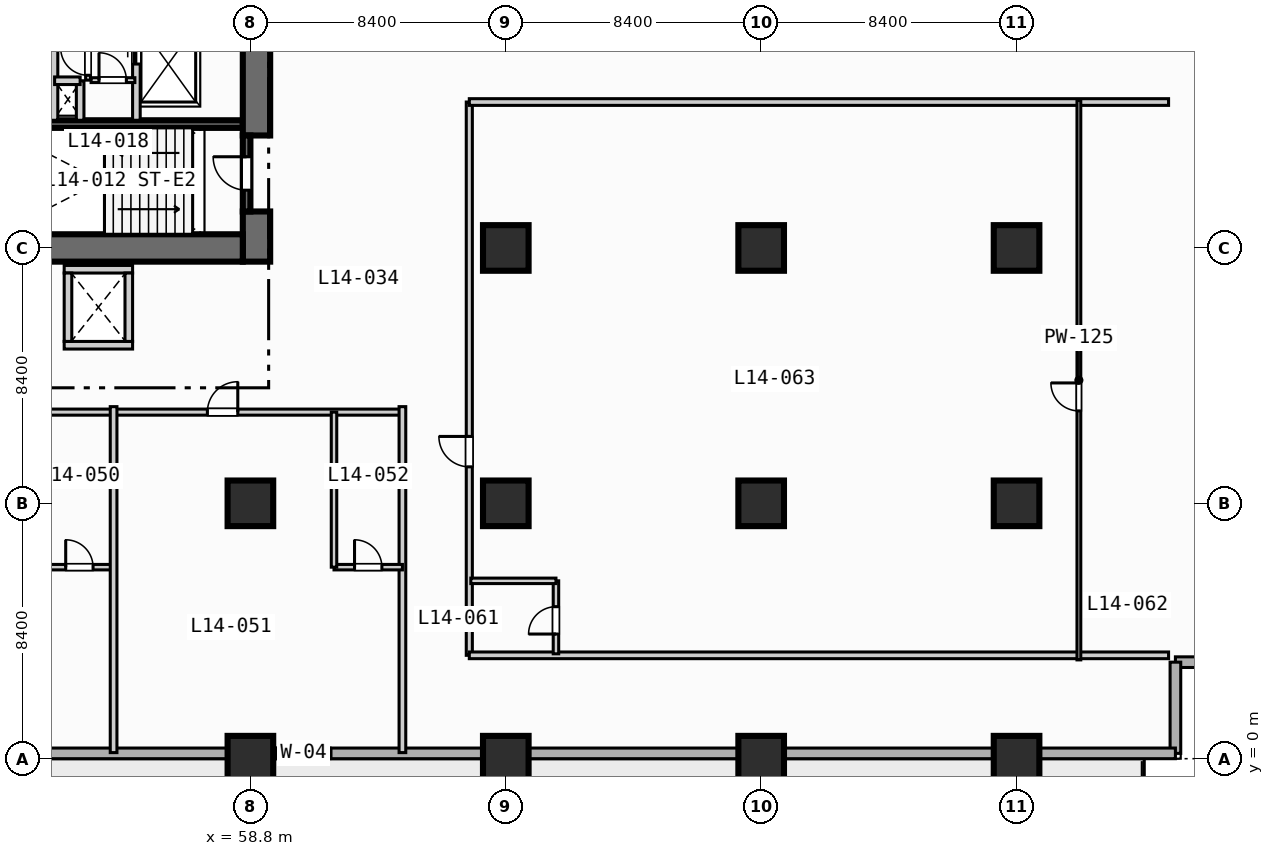
"""IFC4 building model, lengths in metres.
Left out: names, types, materials, properties, quantities, classifications, styles, units other than length and angle.
Written with IfcOpenShell. Run it as: python <this file> out.ifc"""

import sys

from ifc_helpers import new_model, si_unit, direction, frame, frame_2d, origin, origin_2d, place, context, subcontext, project, spatial, rectangle, extrude, element, fill, save


model = new_model("IFC4")
c1 = context("Model", 3, precision=1e-05, world=origin(), true_north=direction((0.0, 1.0)))
c2 = subcontext(c1, "Body", "Model", "MODEL_VIEW")
j1 = project(units=[si_unit("LENGTHUNIT", "METRE"), si_unit("PLANEANGLEUNIT", "RADIAN")], contexts=[c1])
p1 = place(None, origin())
s1 = spatial("IfcSite", under=j1, at=p1, CompositionType="ELEMENT")
p2 = place(p1, origin())
s2 = spatial("IfcBuilding", under=s1, at=p2, CompositionType="ELEMENT")
p3 = place(p2, frame((0.0, 0.0, 62.4)))
s3 = spatial("IfcBuildingStorey", under=s2, at=p3, CompositionType="ELEMENT", Elevation=62.4)
p4 = place(p3, frame((50.5, 20.875, 0.0), z_axis=(0.0, 0.0, 1.0), x_axis=(1.0, 0.0, 0.0)))
e1 = element("IfcWall", 1, at=p4, inside=s3, PredefinedType="SOLIDWALL", context=c2, shape_type="SweptSolid", body=[
    extrude(rectangle(XDim=8.05, YDim=0.25, at=frame_2d((4.025, 0.0))), origin(), (0.0, 0.0, 1.0), 3.55),
])
p5 = place(p3, frame((59.0, 16.35, 0.0), z_axis=(0.0, 0.0, 1.0), x_axis=(0.0, 1.0, 0.0)))
e2 = element("IfcWall", 2, at=p5, inside=s3, PredefinedType="SHEAR", context=c2, shape_type="SweptSolid", body=[
    extrude(rectangle(XDim=1.65, YDim=0.9, at=frame_2d((0.825, 0.0))), origin(), (0.0, 0.0, 1.0), 3.55),
])
p6 = place(p3, frame((59.0, 20.5, 0.0), z_axis=(0.0, 0.0, 1.0), x_axis=(0.0, 1.0, 0.0)))
e3 = element("IfcWall", 3, at=p6, inside=s3, PredefinedType="SHEAR", context=c2, shape_type="SweptSolid", body=[
    extrude(rectangle(XDim=5.15, YDim=0.9, at=frame_2d((2.575, 0.0))), origin(), (0.0, 0.0, 1.0), 3.55),
])
p7 = place(p3, frame((42.2, 16.8, 0.0), z_axis=(0.0, 0.0, 1.0), x_axis=(1.0, 0.0, 0.0)))
e4 = element("IfcWall", 4, at=p7, inside=s3, PredefinedType="SHEAR", context=c2, shape_type="SweptSolid", body=[
    extrude(rectangle(XDim=16.35, YDim=0.9, at=frame_2d((8.175, 0.0))), origin(), (0.0, 0.0, 1.0), 3.55),
])
for number, where, z_axis, x_axis in (
    (5, (58.8, 0.0, 0.0), (0.0, 0.0, 1.0), (1.0, 0.0, 0.0)),
    (6, (58.8, 8.4, 0.0), (0.0, 0.0, 1.0), (1.0, 0.0, 0.0)),
    (7, (67.2, 0.0, 0.0), (0.0, 0.0, 1.0), (1.0, 0.0, 0.0)),
    (8, (67.2, 8.4, 0.0), (0.0, 0.0, 1.0), (1.0, 0.0, 0.0)),
    (9, (67.2, 16.8, 0.0), (0.0, 0.0, 1.0), (1.0, 0.0, 0.0)),
    (10, (75.6, 0.0, 0.0), (0.0, 0.0, 1.0), (1.0, 0.0, 0.0)),
    (11, (75.6, 8.4, 0.0), (0.0, 0.0, 1.0), (1.0, 0.0, 0.0)),
    (12, (75.6, 16.8, 0.0), (0.0, 0.0, 1.0), (1.0, 0.0, 0.0)),
    (13, (84.0, 0.0, 0.0), (0.0, 0.0, 1.0), (1.0, 0.0, 0.0)),
    (14, (84.0, 8.4, 0.0), (0.0, 0.0, 1.0), (1.0, 0.0, 0.0)),
    (15, (84.0, 16.8, 0.0), (0.0, 0.0, 1.0), (1.0, 0.0, 0.0)),
):
    element("IfcColumn", number, at=place(p3, frame(where, z_axis=z_axis, x_axis=x_axis)), inside=s3, PredefinedType="COLUMN", context=c2, shape_type="SweptSolid", body=[
        extrude(rectangle(XDim=1.5, YDim=1.5, at=origin_2d()), origin(), (0.0, 0.0, 1.0), 3.8),
    ])
for number, where, z_axis, x_axis in (
    (16, (92.225, 3.175, 0.0), (0.0, 0.0, 1.0), (-1.0, 0.0, 0.0)),
    (17, (89.225, 3.175, 0.0), (0.0, 0.0, 1.0), (0.0, -1.0, 0.0)),
):
    element("IfcWall", number, at=place(p3, frame(where, z_axis=z_axis, x_axis=x_axis)), inside=s3, PredefinedType="STANDARD", context=c2, shape_type="SweptSolid", body=[
        extrude(rectangle(XDim=3.0, YDim=0.35, at=frame_2d((1.5, 0.0))), origin(), (0.0, 0.0, 1.0), 3.55),
    ])
p8 = place(p3, frame((89.225, 0.175, 0.0), z_axis=(0.0, 0.0, 1.0), x_axis=(-1.0, 0.0, 0.0)))
e18 = element("IfcWall", 18, at=p8, inside=s3, PredefinedType="STANDARD", context=c2, shape_type="SweptSolid", body=[
    extrude(rectangle(XDim=86.05, YDim=0.35, at=frame_2d((43.025, 0.0))), origin(), (0.0, 0.0, 1.0), 3.55),
])
p9 = place(p8, frame((69.025, 0.0, 0.0)))
e19 = element("IfcOpeningElement", 19, at=p9, cuts=e18, PredefinedType="OPENING", context=c2, shape_type="SweptSolid", body=[
    extrude(rectangle(XDim=1.4, YDim=2.2, at=frame_2d((0.7, 1.1))), frame((0.0, 0.185, 0.0), z_axis=(0.0, -1.0, 0.0), x_axis=(1.0, 0.0, 0.0)), (0.0, 0.0, 1.0), 0.37),
])
p10 = place(p8, frame((58.725, 0.0, 0.85)))
e20 = element("IfcOpeningElement", 20, at=p10, cuts=e18, PredefinedType="OPENING", context=c2, shape_type="SweptSolid", body=[
    extrude(rectangle(XDim=2.2, YDim=1.8, at=frame_2d((1.1, 0.9))), frame((0.0, 0.185, 0.0), z_axis=(0.0, -1.0, 0.0), x_axis=(1.0, 0.0, 0.0)), (0.0, 0.0, 1.0), 0.37),
])
p11 = place(p8, frame((50.325, 0.0, 0.85)))
e21 = element("IfcOpeningElement", 21, at=p11, cuts=e18, PredefinedType="OPENING", context=c2, shape_type="SweptSolid", body=[
    extrude(rectangle(XDim=2.2, YDim=1.8, at=frame_2d((1.1, 0.9))), frame((0.0, 0.185, 0.0), z_axis=(0.0, -1.0, 0.0), x_axis=(1.0, 0.0, 0.0)), (0.0, 0.0, 1.0), 0.37),
])
p12 = place(p8, frame((41.925, 0.0, 0.85)))
e22 = element("IfcOpeningElement", 22, at=p12, cuts=e18, PredefinedType="OPENING", context=c2, shape_type="SweptSolid", body=[
    extrude(rectangle(XDim=2.2, YDim=1.8, at=frame_2d((1.1, 0.9))), frame((0.0, 0.185, 0.0), z_axis=(0.0, -1.0, 0.0), x_axis=(1.0, 0.0, 0.0)), (0.0, 0.0, 1.0), 0.37),
])
p13 = place(p8, frame((27.775, 0.0, 0.85)))
e23 = element("IfcOpeningElement", 23, at=p13, cuts=e18, PredefinedType="OPENING", context=c2, shape_type="SweptSolid", body=[
    extrude(rectangle(XDim=1.8, YDim=1.8, at=frame_2d((0.9, 0.9))), frame((0.0, 0.185, 0.0), z_axis=(0.0, -1.0, 0.0), x_axis=(1.0, 0.0, 0.0)), (0.0, 0.0, 1.0), 0.37),
])
p14 = place(p3, frame((58.675, 18.0, 0.0), z_axis=(0.0, 0.0, 1.0), x_axis=(0.0, 1.0, 0.0)))
e24 = element("IfcWall", 24, at=p14, inside=s3, PredefinedType="SOLIDWALL", context=c2, shape_type="SweptSolid", body=[
    extrude(rectangle(XDim=2.5, YDim=0.25, at=frame_2d((1.25, 0.0))), origin(), (0.0, 0.0, 1.0), 3.55),
])
p15 = place(p14, frame((0.7, 0.0, 0.0)))
e25 = element("IfcOpeningElement", 25, at=p15, cuts=e24, PredefinedType="OPENING", context=c2, shape_type="SweptSolid", body=[
    extrude(rectangle(XDim=1.1, YDim=2.15, at=frame_2d((0.55, 1.075))), frame((0.0, 0.135, 0.0), z_axis=(0.0, -1.0, 0.0), x_axis=(1.0, 0.0, 0.0)), (0.0, 0.0, 1.0), 0.27),
])
p16 = place(p3, frame((52.34, 21.0, 0.0), z_axis=(0.0, 0.0, 1.0), x_axis=(0.0, 1.0, 0.0)))
e26 = element("IfcWall", 26, at=p16, inside=s3, PredefinedType="SOLIDWALL", context=c2, shape_type="SweptSolid", body=[
    extrude(rectangle(XDim=3.75, YDim=0.25, at=frame_2d((1.875, 0.0))), origin(), (0.0, 0.0, 1.0), 3.55),
])
p17 = place(p3, frame((55.05, 21.0, 0.0), z_axis=(0.0, 0.0, 1.0), x_axis=(0.0, 1.0, 0.0)))
e27 = element("IfcWall", 27, at=p17, inside=s3, PredefinedType="SOLIDWALL", context=c2, shape_type="SweptSolid", body=[
    extrude(rectangle(XDim=4.15, YDim=0.25, at=frame_2d((2.075, 0.0))), origin(), (0.0, 0.0, 1.0), 3.55),
])
p18 = place(p17, frame((1.85, 0.0, 0.0)))
e28 = element("IfcOpeningElement", 28, at=p18, cuts=e27, PredefinedType="OPENING", context=c2, shape_type="SweptSolid", body=[
    extrude(rectangle(XDim=1.1, YDim=2.15, at=frame_2d((0.55, 1.075))), frame((0.0, 0.135, 0.0), z_axis=(0.0, -1.0, 0.0), x_axis=(1.0, 0.0, 0.0)), (0.0, 0.0, 1.0), 0.27),
])
p19 = place(p3, frame((53.2, 21.0, 0.0), z_axis=(0.0, 0.0, 1.0), x_axis=(0.0, 1.0, 0.0)))
e29 = element("IfcWall", 29, at=p19, inside=s3, PredefinedType="SOLIDWALL", context=c2, shape_type="SweptSolid", body=[
    extrude(rectangle(XDim=1.3, YDim=0.25, at=frame_2d((0.65, 0.0))), origin(), (0.0, 0.0, 1.0), 3.55),
])
p20 = place(p3, frame((52.36, 22.3, 0.0), z_axis=(0.0, 0.0, 1.0), x_axis=(1.0, 0.0, 0.0)))
e30 = element("IfcWall", 30, at=p20, inside=s3, PredefinedType="SOLIDWALL", context=c2, shape_type="SweptSolid", body=[
    extrude(rectangle(XDim=0.84, YDim=0.25, at=frame_2d((0.42, 0.0))), origin(), (0.0, 0.0, 1.0), 3.55),
])
p21 = place(p3, frame((53.56, 22.32, 0.0), z_axis=(0.0, 0.0, 1.0), x_axis=(1.0, 0.0, 0.0)))
e31 = element("IfcWall", 31, at=p21, inside=s3, PredefinedType="PARTITIONING", context=c2, shape_type="SweptSolid", body=[
    extrude(rectangle(XDim=1.44, YDim=0.16, at=frame_2d((0.72, 0.0))), origin(), (0.0, 0.0, 1.0), 3.55),
])
p22 = place(p21, frame((0.26, 0.0, 0.0)))
e32 = element("IfcOpeningElement", 32, at=p22, cuts=e31, PredefinedType="OPENING", context=c2, shape_type="SweptSolid", body=[
    extrude(rectangle(XDim=0.9, YDim=2.1, at=frame_2d((0.45, 1.05))), frame((0.0, 0.09, 0.0), z_axis=(0.0, -1.0, 0.0), x_axis=(1.0, 0.0, 0.0)), (0.0, 0.0, 1.0), 0.18),
])
p23 = place(p3, frame((53.46, 22.32, 0.0), z_axis=(0.0, 0.0, 1.0), x_axis=(0.0, 1.0, 0.0)))
e33 = element("IfcWall", 33, at=p23, inside=s3, PredefinedType="PARTITIONING", context=c2, shape_type="SweptSolid", body=[
    extrude(rectangle(XDim=2.36, YDim=0.16, at=frame_2d((1.18, 0.0))), origin(), (0.0, 0.0, 1.0), 3.55),
])
p24 = place(p23, frame((0.16, 0.0, 0.0)))
e34 = element("IfcOpeningElement", 34, at=p24, cuts=e33, PredefinedType="OPENING", context=c2, shape_type="SweptSolid", body=[
    extrude(rectangle(XDim=0.9, YDim=2.1, at=frame_2d((0.45, 1.05))), frame((0.0, 0.09, 0.0), z_axis=(0.0, -1.0, 0.0), x_axis=(1.0, 0.0, 0.0)), (0.0, 0.0, 1.0), 0.18),
])
for number, where, z_axis, x_axis in (
    (35, (52.675, 13.6, 0.0), (0.0, 0.0, 1.0), (1.0, 0.0, 0.0)),
    (36, (52.675, 16.1, 0.0), (0.0, 0.0, 1.0), (1.0, 0.0, 0.0)),
    (37, (52.8, 13.725, 0.0), (0.0, 0.0, 1.0), (0.0, 1.0, 0.0)),
    (38, (54.8, 13.725, 0.0), (0.0, 0.0, 1.0), (0.0, 1.0, 0.0)),
):
    element("IfcWall", number, at=place(p3, frame(where, z_axis=z_axis, x_axis=x_axis)), inside=s3, PredefinedType="SOLIDWALL", context=c2, shape_type="SweptSolid", body=[
        extrude(rectangle(XDim=2.25, YDim=0.25, at=frame_2d((1.125, 0.0))), origin(), (0.0, 0.0, 1.0), 3.55),
    ])
p25 = place(p3, frame((13.5, 11.4, 0.0), z_axis=(0.0, 0.0, 1.0), x_axis=(1.0, 0.0, 0.0)))
e39 = element("IfcWall", 39, at=p25, inside=s3, PredefinedType="PARTITIONING", context=c2, shape_type="SweptSolid", body=[
    extrude(rectangle(XDim=50.3, YDim=0.2, at=frame_2d((25.15, 0.0))), origin(), (0.0, 0.0, 1.0), 3.55),
])
p26 = place(p25, frame((2.135, 0.0, 0.0)))
e40 = element("IfcOpeningElement", 40, at=p26, cuts=e39, PredefinedType="OPENING", context=c2, shape_type="SweptSolid", body=[
    extrude(rectangle(XDim=1.0, YDim=2.15, at=frame_2d((0.5, 1.075))), frame((0.0, 0.11, 0.0), z_axis=(0.0, -1.0, 0.0), x_axis=(1.0, 0.0, 0.0)), (0.0, 0.0, 1.0), 0.22),
])
p27 = place(p25, frame((14.665, 0.0, 0.0)))
e41 = element("IfcOpeningElement", 41, at=p27, cuts=e39, PredefinedType="OPENING", context=c2, shape_type="SweptSolid", body=[
    extrude(rectangle(XDim=1.0, YDim=2.15, at=frame_2d((0.5, 1.075))), frame((0.0, 0.11, 0.0), z_axis=(0.0, -1.0, 0.0), x_axis=(1.0, 0.0, 0.0)), (0.0, 0.0, 1.0), 0.22),
])
p28 = place(p25, frame((22.31, 0.0, 0.0)))
e42 = element("IfcOpeningElement", 42, at=p28, cuts=e39, PredefinedType="OPENING", context=c2, shape_type="SweptSolid", body=[
    extrude(rectangle(XDim=1.0, YDim=2.15, at=frame_2d((0.5, 1.075))), frame((0.0, 0.11, 0.0), z_axis=(0.0, -1.0, 0.0), x_axis=(1.0, 0.0, 0.0)), (0.0, 0.0, 1.0), 0.22),
])
p29 = place(p25, frame((32.51, 0.0, 0.0)))
e43 = element("IfcOpeningElement", 43, at=p29, cuts=e39, PredefinedType="OPENING", context=c2, shape_type="SweptSolid", body=[
    extrude(rectangle(XDim=1.0, YDim=2.15, at=frame_2d((0.5, 1.075))), frame((0.0, 0.11, 0.0), z_axis=(0.0, -1.0, 0.0), x_axis=(1.0, 0.0, 0.0)), (0.0, 0.0, 1.0), 0.22),
])
p30 = place(p25, frame((43.885, 0.0, 0.0)))
e44 = element("IfcOpeningElement", 44, at=p30, cuts=e39, PredefinedType="OPENING", context=c2, shape_type="SweptSolid", body=[
    extrude(rectangle(XDim=1.0, YDim=2.15, at=frame_2d((0.5, 1.075))), frame((0.0, 0.11, 0.0), z_axis=(0.0, -1.0, 0.0), x_axis=(1.0, 0.0, 0.0)), (0.0, 0.0, 1.0), 0.22),
])
p31 = place(p3, frame((52.05, 6.3, 0.0), z_axis=(0.0, 0.0, 1.0), x_axis=(1.0, 0.0, 0.0)))
e45 = element("IfcWall", 45, at=p31, inside=s3, PredefinedType="PLUMBINGWALL", context=c2, shape_type="SweptSolid", body=[
    extrude(rectangle(XDim=2.25, YDim=0.18, at=frame_2d((1.125, 0.0))), origin(), (0.0, 0.0, 1.0), 3.55),
])
p32 = place(p31, frame((0.675, 0.0, 0.0)))
e46 = element("IfcOpeningElement", 46, at=p32, cuts=e45, PredefinedType="OPENING", context=c2, shape_type="SweptSolid", body=[
    extrude(rectangle(XDim=0.9, YDim=2.1, at=frame_2d((0.45, 1.05))), frame((0.0, 0.1, 0.0), z_axis=(0.0, -1.0, 0.0), x_axis=(1.0, 0.0, 0.0)), (0.0, 0.0, 1.0), 0.2),
])
for number, where, z_axis, x_axis in (
    (47, (54.3, 0.2, 0.0), (0.0, 0.0, 1.0), (0.0, 1.0, 0.0)),
    (48, (63.8, 0.2, 0.0), (0.0, 0.0, 1.0), (0.0, 1.0, 0.0)),
):
    element("IfcWall", number, at=place(p3, frame(where, z_axis=z_axis, x_axis=x_axis)), inside=s3, PredefinedType="PARTITIONING", context=c2, shape_type="SweptSolid", body=[
        extrude(rectangle(XDim=11.38, YDim=0.22, at=frame_2d((5.69, 0.0))), origin(), (0.0, 0.0, 1.0), 3.55),
    ])
p33 = place(p3, frame((61.55, 6.3, 0.0), z_axis=(0.0, 0.0, 1.0), x_axis=(1.0, 0.0, 0.0)))
e49 = element("IfcWall", 49, at=p33, inside=s3, PredefinedType="PLUMBINGWALL", context=c2, shape_type="SweptSolid", body=[
    extrude(rectangle(XDim=2.25, YDim=0.18, at=frame_2d((1.125, 0.0))), origin(), (0.0, 0.0, 1.0), 3.55),
])
p34 = place(p33, frame((0.675, 0.0, 0.0)))
e50 = element("IfcOpeningElement", 50, at=p34, cuts=e49, PredefinedType="OPENING", context=c2, shape_type="SweptSolid", body=[
    extrude(rectangle(XDim=0.9, YDim=2.1, at=frame_2d((0.45, 1.05))), frame((0.0, 0.1, 0.0), z_axis=(0.0, -1.0, 0.0), x_axis=(1.0, 0.0, 0.0)), (0.0, 0.0, 1.0), 0.2),
])
p35 = place(p3, frame((61.55, 6.3, 0.0), z_axis=(0.0, 0.0, 1.0), x_axis=(0.0, 1.0, 0.0)))
e51 = element("IfcWall", 51, at=p35, inside=s3, PredefinedType="PLUMBINGWALL", context=c2, shape_type="SweptSolid", body=[
    extrude(rectangle(XDim=5.1, YDim=0.18, at=frame_2d((2.55, 0.0))), origin(), (0.0, 0.0, 1.0), 3.55),
])
p36 = place(p3, frame((66.0, 3.4, 0.0), z_axis=(0.0, 0.0, 1.0), x_axis=(0.0, 1.0, 0.0)))
e52 = element("IfcWall", 52, at=p36, inside=s3, PredefinedType="PARTITIONING", context=c2, shape_type="SweptSolid", body=[
    extrude(rectangle(XDim=18.2, YDim=0.2, at=frame_2d((9.1, 0.0))), origin(), (0.0, 0.0, 1.0), 3.55),
])
p37 = place(p36, frame((6.2, 0.0, 0.0)))
e53 = element("IfcOpeningElement", 53, at=p37, cuts=e52, PredefinedType="OPENING", context=c2, shape_type="SweptSolid", body=[
    extrude(rectangle(XDim=1.0, YDim=2.15, at=frame_2d((0.5, 1.075))), frame((0.0, 0.11, 0.0), z_axis=(0.0, -1.0, 0.0), x_axis=(1.0, 0.0, 0.0)), (0.0, 0.0, 1.0), 0.22),
])
for number, where, z_axis, x_axis in (
    (54, (66.0, 3.4, 0.0), (0.0, 0.0, 1.0), (1.0, 0.0, 0.0)),
    (55, (66.0, 21.6, 0.0), (0.0, 0.0, 1.0), (1.0, 0.0, 0.0)),
):
    element("IfcWall", number, at=place(p3, frame(where, z_axis=z_axis, x_axis=x_axis)), inside=s3, PredefinedType="PARTITIONING", context=c2, shape_type="SweptSolid", body=[
        extrude(rectangle(XDim=23.0, YDim=0.22, at=frame_2d((11.5, 0.0))), origin(), (0.0, 0.0, 1.0), 3.55),
    ])
p38 = place(p3, frame((68.85, 3.45, 0.0), z_axis=(0.0, 0.0, 1.0), x_axis=(0.0, 1.0, 0.0)))
e56 = element("IfcWall", 56, at=p38, inside=s3, PredefinedType="PLUMBINGWALL", context=c2, shape_type="SweptSolid", body=[
    extrude(rectangle(XDim=2.4, YDim=0.18, at=frame_2d((1.2, 0.0))), origin(), (0.0, 0.0, 1.0), 3.55),
])
p39 = place(p38, frame((0.65, 0.0, 0.0)))
e57 = element("IfcOpeningElement", 57, at=p39, cuts=e56, PredefinedType="OPENING", context=c2, shape_type="SweptSolid", body=[
    extrude(rectangle(XDim=0.9, YDim=2.1, at=frame_2d((0.45, 1.05))), frame((0.0, 0.1, 0.0), z_axis=(0.0, -1.0, 0.0), x_axis=(1.0, 0.0, 0.0)), (0.0, 0.0, 1.0), 0.2),
])
p40 = place(p3, frame((66.05, 5.85, 0.0), z_axis=(0.0, 0.0, 1.0), x_axis=(1.0, 0.0, 0.0)))
e58 = element("IfcWall", 58, at=p40, inside=s3, PredefinedType="PLUMBINGWALL", context=c2, shape_type="SweptSolid", body=[
    extrude(rectangle(XDim=2.8, YDim=0.18, at=frame_2d((1.4, 0.0))), origin(), (0.0, 0.0, 1.0), 3.55),
])
p41 = place(p3, frame((86.05, 3.25, 0.0), z_axis=(0.0, 0.0, 1.0), x_axis=(0.0, 1.0, 0.0)))
e59 = element("IfcWall", 59, at=p41, inside=s3, PredefinedType="PARTITIONING", context=c2, shape_type="SweptSolid", body=[
    extrude(rectangle(XDim=18.4, YDim=0.125, at=frame_2d((9.2, 0.0))), origin(), (0.0, 0.0, 1.0), 3.55),
])
p42 = place(p41, frame((8.19, 0.0, 0.0)))
e60 = element("IfcOpeningElement", 60, at=p42, cuts=e59, PredefinedType="OPENING", context=c2, shape_type="SweptSolid", body=[
    extrude(rectangle(XDim=0.92, YDim=2.1, at=frame_2d((0.46, 1.05))), frame((0.0, 0.073, 0.0), z_axis=(0.0, -1.0, 0.0), x_axis=(1.0, 0.0, 0.0)), (0.0, 0.0, 1.0), 0.145),
])
p43 = place(p13, origin())
e61 = element("IfcWindow", 61, at=p43, inside=s3, PartitioningType="SINGLE_PANEL", PredefinedType="WINDOW", context=c2, shape_type="SweptSolid", body=[
    extrude(rectangle(XDim=1.8, YDim=1.8, at=frame_2d((0.9, 0.9))), frame((0.0, 0.03, 0.0), z_axis=(0.0, -1.0, 0.0), x_axis=(1.0, 0.0, 0.0)), (0.0, 0.0, 1.0), 0.06),
])
fill(e23, e61)
p44 = place(p15, origin())
e62 = element("IfcDoor", 62, at=p44, inside=s3, OperationType="SINGLE_SWING_RIGHT", PredefinedType="DOOR", context=c2, shape_type="SweptSolid", body=[
    extrude(rectangle(XDim=1.1, YDim=2.15, at=frame_2d((0.55, 1.075))), frame((0.0, 0.025, 0.0), z_axis=(0.0, -1.0, 0.0), x_axis=(1.0, 0.0, 0.0)), (0.0, 0.0, 1.0), 0.05),
])
fill(e25, e62)
p45 = place(p18, origin())
e63 = element("IfcDoor", 63, at=p45, inside=s3, OperationType="SLIDING_TO_LEFT", PredefinedType="DOOR", context=c2, shape_type="SweptSolid", body=[
    extrude(rectangle(XDim=1.1, YDim=2.15, at=frame_2d((0.55, 1.075))), frame((0.0, 0.025, 0.0), z_axis=(0.0, -1.0, 0.0), x_axis=(1.0, 0.0, 0.0)), (0.0, 0.0, 1.0), 0.05),
])
fill(e28, e63)
p46 = place(p22, origin())
e64 = element("IfcDoor", 64, at=p46, inside=s3, OperationType="SINGLE_SWING_LEFT", PredefinedType="DOOR", context=c2, shape_type="SweptSolid", body=[
    extrude(rectangle(XDim=0.9, YDim=2.1, at=frame_2d((0.45, 1.05))), frame((0.0, 0.025, 0.0), z_axis=(0.0, -1.0, 0.0), x_axis=(1.0, 0.0, 0.0)), (0.0, 0.0, 1.0), 0.05),
])
fill(e32, e64)
p47 = place(p24, origin())
e65 = element("IfcDoor", 65, at=p47, inside=s3, OperationType="SINGLE_SWING_RIGHT", PredefinedType="DOOR", context=c2, shape_type="SweptSolid", body=[
    extrude(rectangle(XDim=0.9, YDim=2.1, at=frame_2d((0.45, 1.05))), frame((0.0, 0.025, 0.0), z_axis=(0.0, -1.0, 0.0), x_axis=(1.0, 0.0, 0.0)), (0.0, 0.0, 1.0), 0.05),
])
fill(e34, e65)
p48 = place(p30, origin())
e66 = element("IfcDoor", 66, at=p48, inside=s3, OperationType="SINGLE_SWING_RIGHT", PredefinedType="DOOR", context=c2, shape_type="SweptSolid", body=[
    extrude(rectangle(XDim=1.0, YDim=2.15, at=frame_2d((0.5, 1.075))), frame((0.0, 0.025, 0.0), z_axis=(0.0, -1.0, 0.0), x_axis=(1.0, 0.0, 0.0)), (0.0, 0.0, 1.0), 0.05),
])
fill(e44, e66)
p49 = place(p32, origin())
e67 = element("IfcDoor", 67, at=p49, inside=s3, OperationType="SINGLE_SWING_LEFT", PredefinedType="DOOR", context=c2, shape_type="SweptSolid", body=[
    extrude(rectangle(XDim=0.9, YDim=2.1, at=frame_2d((0.45, 1.05))), frame((0.0, 0.025, 0.0), z_axis=(0.0, -1.0, 0.0), x_axis=(1.0, 0.0, 0.0)), (0.0, 0.0, 1.0), 0.05),
])
fill(e46, e67)
p50 = place(p34, origin())
e68 = element("IfcDoor", 68, at=p50, inside=s3, OperationType="SINGLE_SWING_LEFT", PredefinedType="DOOR", context=c2, shape_type="SweptSolid", body=[
    extrude(rectangle(XDim=0.9, YDim=2.1, at=frame_2d((0.45, 1.05))), frame((0.0, 0.025, 0.0), z_axis=(0.0, -1.0, 0.0), x_axis=(1.0, 0.0, 0.0)), (0.0, 0.0, 1.0), 0.05),
])
fill(e50, e68)
p51 = place(p37, origin())
e69 = element("IfcDoor", 69, at=p51, inside=s3, OperationType="SINGLE_SWING_RIGHT", PredefinedType="DOOR", context=c2, shape_type="SweptSolid", body=[
    extrude(rectangle(XDim=1.0, YDim=2.15, at=frame_2d((0.5, 1.075))), frame((0.0, 0.025, 0.0), z_axis=(0.0, -1.0, 0.0), x_axis=(1.0, 0.0, 0.0)), (0.0, 0.0, 1.0), 0.05),
])
fill(e53, e69)
p52 = place(p39, origin())
e70 = element("IfcDoor", 70, at=p52, inside=s3, OperationType="SINGLE_SWING_LEFT", PredefinedType="DOOR", context=c2, shape_type="SweptSolid", body=[
    extrude(rectangle(XDim=0.9, YDim=2.1, at=frame_2d((0.45, 1.05))), frame((0.0, 0.025, 0.0), z_axis=(0.0, -1.0, 0.0), x_axis=(1.0, 0.0, 0.0)), (0.0, 0.0, 1.0), 0.05),
])
fill(e57, e70)
p53 = place(p42, origin())
e71 = element("IfcDoor", 71, at=p53, inside=s3, OperationType="SINGLE_SWING_RIGHT", PredefinedType="DOOR", context=c2, shape_type="SweptSolid", body=[
    extrude(rectangle(XDim=0.92, YDim=2.1, at=frame_2d((0.46, 1.05))), frame((0.0, 0.025, 0.0), z_axis=(0.0, -1.0, 0.0), x_axis=(1.0, 0.0, 0.0)), (0.0, 0.0, 1.0), 0.05),
])
fill(e60, e71)
save(model, sys.argv[1])
